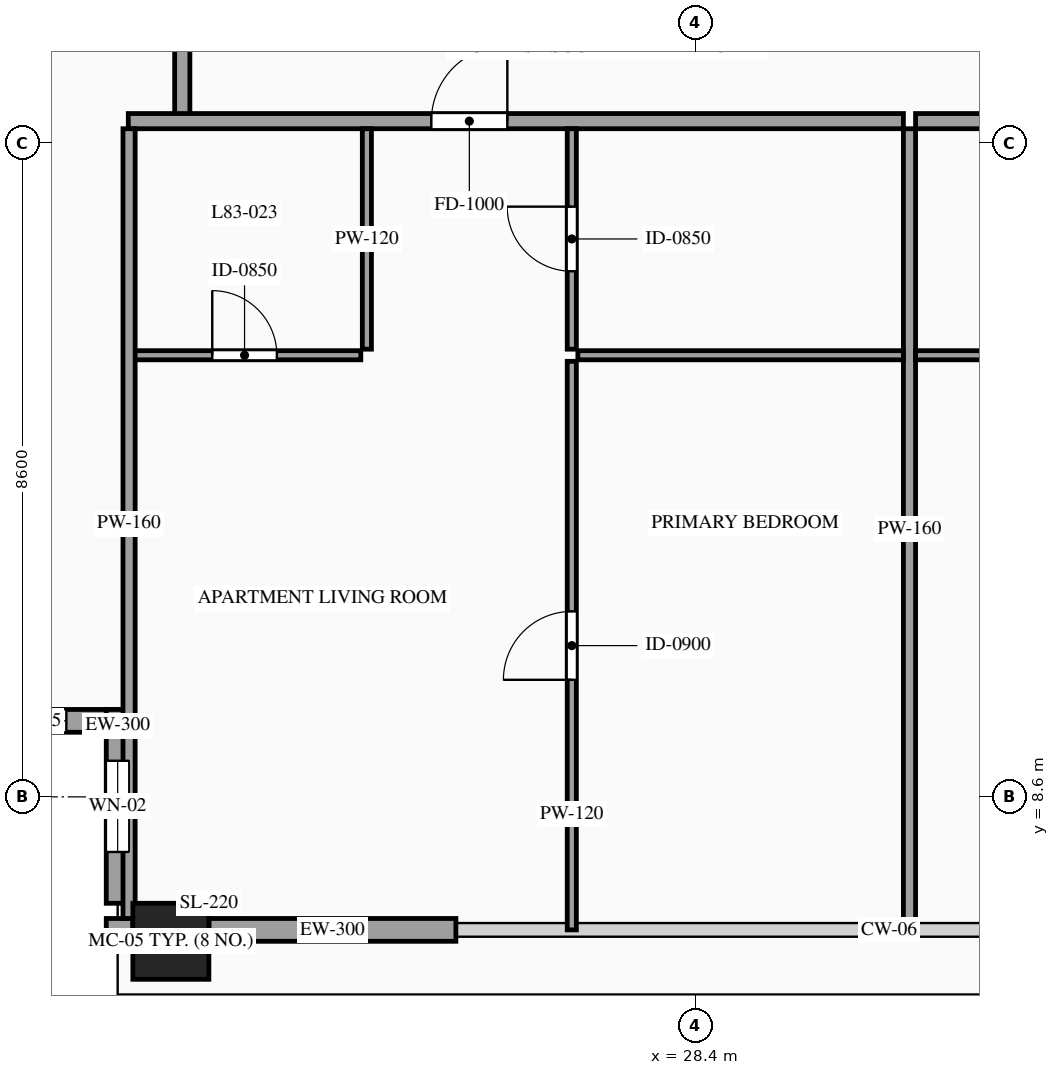
"""IFC4 building model, lengths in metres.
Left out: names, types, materials, properties, quantities, classifications, styles, units other than length and angle.
Written with IfcOpenShell. Run it as: python <this file> out.ifc"""

import sys

from ifc_helpers import new_model, si_unit, direction, frame, frame_2d, origin, origin_2d, place, context, subcontext, project, spatial, rectangle, hollow_rectangle, extrude, source, transform, mapped, element, fill, save


model = new_model("IFC4")
c1 = context("Model", 3, precision=1e-05, world=origin(), true_north=direction((0.0, 1.0)))
c2 = subcontext(c1, "Body", "Model", "MODEL_VIEW")
j1 = project(units=[si_unit("LENGTHUNIT", "METRE"), si_unit("PLANEANGLEUNIT", "RADIAN")], contexts=[c1])
p1 = place(None, origin())
s1 = spatial("IfcSite", under=j1, at=p1, CompositionType="ELEMENT")
p2 = place(p1, origin())
s2 = spatial("IfcBuilding", under=s1, at=p2, CompositionType="ELEMENT")
p3 = place(p2, frame((0.0, 0.0, 311.2)))
s3 = spatial("IfcBuildingStorey", under=s2, at=p3, CompositionType="ELEMENT", Elevation=311.2)
m1 = source(origin(), c2, "Body", "SweptSolid", [
    extrude(hollow_rectangle(XDim=1.0, YDim=1.0, WallThickness=0.048, at=origin_2d()), origin(), (0.0, 0.0, 1.0), 3.5),
])
p4 = place(p3, frame((21.5, 6.7, 0.0), z_axis=(0.0, 0.0, 1.0), x_axis=(1.0, 0.0, 0.0)))
e1 = element("IfcColumn", 1, at=p4, inside=s3, PredefinedType="COLUMN", context=c2, shape_type="MappedRepresentation", body=[
    mapped(m1, transform((0.0, 0.0, 0.0), scale=1.0)),
])
p5 = place(p3, frame((18.4, 9.6, 0.0), z_axis=(0.0, 0.0, 1.0), x_axis=(1.0, 0.0, 0.0)))
e2 = element("IfcWall", 2, at=p5, inside=s3, PredefinedType="SOLIDWALL", context=c2, shape_type="SweptSolid", body=[
    extrude(rectangle(XDim=2.55, YDim=0.3, at=frame_2d((1.275, 0.0))), origin(), (0.0, 0.0, 1.0), 3.28),
])
p6 = place(p5, frame((0.825, 0.0, 0.85)))
e3 = element("IfcOpeningElement", 3, at=p6, cuts=e2, PredefinedType="OPENING", context=c2, shape_type="SweptSolid", body=[
    extrude(rectangle(XDim=0.9, YDim=1.5, at=frame_2d((0.45, 0.75))), frame((0.0, 0.165, 0.0), z_axis=(0.0, -1.0, 0.0), x_axis=(1.0, 0.0, 0.0)), (0.0, 0.0, 1.0), 0.33),
])
p7 = place(p3, frame((20.8, 9.75, 0.0), z_axis=(0.0, 0.0, 1.0), x_axis=(0.0, -1.0, 0.0)))
e4 = element("IfcWall", 4, at=p7, inside=s3, PredefinedType="SOLIDWALL", context=c2, shape_type="SweptSolid", body=[
    extrude(rectangle(XDim=2.55, YDim=0.3, at=frame_2d((1.275, 0.0))), origin(), (0.0, 0.0, 1.0), 3.28),
])
p8 = place(p7, frame((0.675, 0.0, 0.85)))
e5 = element("IfcOpeningElement", 5, at=p8, cuts=e4, PredefinedType="OPENING", context=c2, shape_type="SweptSolid", body=[
    extrude(rectangle(XDim=1.2, YDim=2.1, at=frame_2d((0.6, 1.05))), frame((0.0, 0.165, 0.0), z_axis=(0.0, -1.0, 0.0), x_axis=(1.0, 0.0, 0.0)), (0.0, 0.0, 1.0), 0.33),
])
m2 = source(origin(), c2, "Body", "SweptSolid", [
    extrude(rectangle(XDim=0.35, YDim=0.3, at=frame_2d((0.175, 0.0))), origin(), (0.0, 0.0, 1.0), 3.28),
])
p9 = place(p3, frame((20.65, 6.85, 0.0), z_axis=(0.0, 0.0, 1.0), x_axis=(1.0, 0.0, 0.0)))
e6 = element("IfcWall", 6, at=p9, inside=s3, PredefinedType="SOLIDWALL", context=c2, shape_type="MappedRepresentation", body=[
    mapped(m2, transform((0.0, 0.0, 0.0), scale=1.0)),
])
m3 = source(origin(), c2, "Body", "SweptSolid", [
    extrude(rectangle(XDim=3.25, YDim=0.3, at=frame_2d((1.625, 0.0))), origin(), (0.0, 0.0, 1.0), 2.885),
])
p10 = place(p3, frame((22.0, 6.85, 0.0), z_axis=(0.0, 0.0, 1.0), x_axis=(1.0, 0.0, 0.0)))
e7 = element("IfcWall", 7, at=p10, inside=s3, PredefinedType="SOLIDWALL", context=c2, shape_type="MappedRepresentation", body=[
    mapped(m3, transform((0.0, 0.0, 0.0), scale=1.0)),
])
m4 = source(origin(), c2, "Body", "SweptSolid", [
    extrude(rectangle(XDim=1.7, YDim=0.2, at=frame_2d((0.85, 0.0))), origin(), (0.0, 0.0, 1.0), 3.28),
])
p11 = place(p3, frame((21.65, 17.55, 0.0), z_axis=(0.0, 0.0, 1.0), x_axis=(0.0, 1.0, 0.0)))
e8 = element("IfcWall", 8, at=p11, inside=s3, PredefinedType="PARTITIONING", context=c2, shape_type="MappedRepresentation", body=[
    mapped(m4, transform((0.0, 0.0, 0.0), scale=1.0)),
])
p12 = place(p3, frame((20.94, 17.49, 0.0), z_axis=(0.0, 0.0, 1.0), x_axis=(1.0, 0.0, 0.0)))
e9 = element("IfcWall", 9, at=p12, inside=s3, PredefinedType="PARTITIONING", context=c2, shape_type="SweptSolid", body=[
    extrude(rectangle(XDim=10.198, YDim=0.2, at=frame_2d((5.099, 0.0))), origin(), (0.0, 0.0, 1.0), 3.28),
])
p13 = place(p12, frame((3.987, 0.0, 0.0)))
e10 = element("IfcOpeningElement", 10, at=p13, cuts=e9, PredefinedType="OPENING", context=c2, shape_type="SweptSolid", body=[
    extrude(rectangle(XDim=1.0, YDim=2.2, at=frame_2d((0.5, 1.1))), frame((0.0, 0.115, 0.0), z_axis=(0.0, -1.0, 0.0), x_axis=(1.0, 0.0, 0.0)), (0.0, 0.0, 1.0), 0.23),
])
m5 = source(origin(), c2, "Body", "SweptSolid", [
    extrude(rectangle(XDim=10.54, YDim=0.16, at=frame_2d((5.27, 0.0))), origin(), (0.0, 0.0, 1.0), 3.28),
])
p14 = place(p3, frame((31.218, 6.85, 0.0), z_axis=(0.0, 0.0, 1.0), x_axis=(0.0, 1.0, 0.0)))
e11 = element("IfcWall", 11, at=p14, inside=s3, PredefinedType="PARTITIONING", context=c2, shape_type="MappedRepresentation", body=[
    mapped(m5, transform((0.0, 0.0, 0.0), scale=1.0)),
])
p15 = place(p3, frame((20.94, 14.41, 0.0), z_axis=(0.0, 0.0, 1.0), x_axis=(1.0, 0.0, 0.0)))
e12 = element("IfcWall", 12, at=p15, inside=s3, PredefinedType="PARTITIONING", context=c2, shape_type="SweptSolid", body=[
    extrude(rectangle(XDim=3.059, YDim=0.12, at=frame_2d((1.53, 0.0))), origin(), (0.0, 0.0, 1.0), 3.28),
])
p16 = place(p15, frame((1.104, 0.0, 0.0)))
e13 = element("IfcOpeningElement", 13, at=p16, cuts=e12, PredefinedType="OPENING", context=c2, shape_type="SweptSolid", body=[
    extrude(rectangle(XDim=0.85, YDim=2.1, at=frame_2d((0.425, 1.05))), frame((0.0, 0.075, 0.0), z_axis=(0.0, -1.0, 0.0), x_axis=(1.0, 0.0, 0.0)), (0.0, 0.0, 1.0), 0.15),
])
m6 = source(origin(), c2, "Body", "SweptSolid", [
    extrude(rectangle(XDim=2.9, YDim=0.12, at=frame_2d((1.45, 0.0))), origin(), (0.0, 0.0, 1.0), 3.28),
])
p17 = place(p3, frame((24.079, 14.49, 0.0), z_axis=(0.0, 0.0, 1.0), x_axis=(0.0, 1.0, 0.0)))
e14 = element("IfcWall", 14, at=p17, inside=s3, PredefinedType="PARTITIONING", context=c2, shape_type="MappedRepresentation", body=[
    mapped(m6, transform((0.0, 0.0, 0.0), scale=1.0)),
])
m7 = source(origin(), c2, "Body", "SweptSolid", [
    extrude(rectangle(XDim=4.283, YDim=0.12, at=frame_2d((2.142, 0.0))), origin(), (0.0, 0.0, 1.0), 3.28),
])
p18 = place(p3, frame((26.855, 14.41, 0.0), z_axis=(0.0, 0.0, 1.0), x_axis=(1.0, 0.0, 0.0)))
e15 = element("IfcWall", 15, at=p18, inside=s3, PredefinedType="PARTITIONING", context=c2, shape_type="MappedRepresentation", body=[
    mapped(m7, transform((0.0, 0.0, 0.0), scale=1.0)),
])
p19 = place(p3, frame((26.775, 14.49, 0.0), z_axis=(0.0, 0.0, 1.0), x_axis=(0.0, 1.0, 0.0)))
e16 = element("IfcWall", 16, at=p19, inside=s3, PredefinedType="PARTITIONING", context=c2, shape_type="SweptSolid", body=[
    extrude(rectangle(XDim=2.9, YDim=0.12, at=frame_2d((1.45, 0.0))), origin(), (0.0, 0.0, 1.0), 3.28),
])
p20 = place(p19, frame((1.025, 0.0, 0.0)))
e17 = element("IfcOpeningElement", 17, at=p20, cuts=e16, PredefinedType="OPENING", context=c2, shape_type="SweptSolid", body=[
    extrude(rectangle(XDim=0.85, YDim=2.1, at=frame_2d((0.425, 1.05))), frame((0.0, 0.075, 0.0), z_axis=(0.0, -1.0, 0.0), x_axis=(1.0, 0.0, 0.0)), (0.0, 0.0, 1.0), 0.15),
])
p21 = place(p3, frame((26.775, 6.85, 0.0), z_axis=(0.0, 0.0, 1.0), x_axis=(0.0, 1.0, 0.0)))
e18 = element("IfcWall", 18, at=p21, inside=s3, PredefinedType="PARTITIONING", context=c2, shape_type="SweptSolid", body=[
    extrude(rectangle(XDim=7.48, YDim=0.12, at=frame_2d((3.74, 0.0))), origin(), (0.0, 0.0, 1.0), 3.28),
])
p22 = place(p21, frame((3.29, 0.0, 0.0)))
e19 = element("IfcOpeningElement", 19, at=p22, cuts=e18, PredefinedType="OPENING", context=c2, shape_type="SweptSolid", body=[
    extrude(rectangle(XDim=0.9, YDim=2.15, at=frame_2d((0.45, 1.075))), frame((0.0, 0.075, 0.0), z_axis=(0.0, -1.0, 0.0), x_axis=(1.0, 0.0, 0.0)), (0.0, 0.0, 1.0), 0.15),
])
p23 = place(p3, frame((31.298, 17.49, 0.0), z_axis=(0.0, 0.0, 1.0), x_axis=(1.0, 0.0, 0.0)))
e20 = element("IfcWall", 20, at=p23, inside=s3, PredefinedType="PARTITIONING", context=c2, shape_type="SweptSolid", body=[
    extrude(rectangle(XDim=10.761, YDim=0.2, at=frame_2d((5.38, 0.0))), origin(), (0.0, 0.0, 1.0), 3.28),
])
p24 = place(p23, frame((4.234, 0.0, 0.0)))
e21 = element("IfcOpeningElement", 21, at=p24, cuts=e20, PredefinedType="OPENING", context=c2, shape_type="SweptSolid", body=[
    extrude(rectangle(XDim=1.0, YDim=2.2, at=frame_2d((0.5, 1.1))), frame((0.0, 0.115, 0.0), z_axis=(0.0, -1.0, 0.0), x_axis=(1.0, 0.0, 0.0)), (0.0, 0.0, 1.0), 0.23),
])
p25 = place(p3, frame((31.298, 14.41, 0.0), z_axis=(0.0, 0.0, 1.0), x_axis=(1.0, 0.0, 0.0)))
e22 = element("IfcWall", 22, at=p25, inside=s3, PredefinedType="PARTITIONING", context=c2, shape_type="SweptSolid", body=[
    extrude(rectangle(XDim=3.228, YDim=0.12, at=frame_2d((1.614, 0.0))), origin(), (0.0, 0.0, 1.0), 3.28),
])
p26 = place(p25, frame((1.189, 0.0, 0.0)))
e23 = element("IfcOpeningElement", 23, at=p26, cuts=e22, PredefinedType="OPENING", context=c2, shape_type="SweptSolid", body=[
    extrude(rectangle(XDim=0.85, YDim=2.1, at=frame_2d((0.425, 1.05))), frame((0.0, 0.075, 0.0), z_axis=(0.0, -1.0, 0.0), x_axis=(1.0, 0.0, 0.0)), (0.0, 0.0, 1.0), 0.15),
])
m8 = source(origin(), c2, "Body", "SweptSolid", [
    extrude(rectangle(XDim=10.39, YDim=0.16, at=frame_2d((5.195, 0.0))), origin(), (0.0, 0.0, 1.0), 3.28),
])
p27 = place(p3, frame((20.95, 7.0, 0.0), z_axis=(0.0, 0.0, 1.0), x_axis=(0.0, 1.0, 0.0)))
e24 = element("IfcWall", 24, at=p27, inside=s3, PredefinedType="PARTITIONING", context=c2, shape_type="MappedRepresentation", body=[
    mapped(m8, transform((0.0, 0.0, 0.0), scale=1.0)),
])
m9 = source(origin(), c2, "Body", "SweptSolid", [
    extrude(rectangle(XDim=0.9, YDim=1.5, at=frame_2d((0.45, 0.75))), frame((0.0, 0.03, 0.0), z_axis=(0.0, -1.0, 0.0), x_axis=(1.0, 0.0, 0.0)), (0.0, 0.0, 1.0), 0.06),
])
p28 = place(p6, origin())
e25 = element("IfcWindow", 25, at=p28, inside=s3, PartitioningType="SINGLE_PANEL", PredefinedType="WINDOW", context=c2, shape_type="MappedRepresentation", body=[
    mapped(m9, transform((0.0, 0.0, 0.0), scale=1.0)),
])
fill(e3, e25)
m10 = source(origin(), c2, "Body", "SweptSolid", [
    extrude(rectangle(XDim=1.2, YDim=2.1, at=frame_2d((0.6, 1.05))), frame((0.0, 0.03, 0.0), z_axis=(0.0, -1.0, 0.0), x_axis=(1.0, 0.0, 0.0)), (0.0, 0.0, 1.0), 0.06),
])
p29 = place(p8, origin())
e26 = element("IfcWindow", 26, at=p29, inside=s3, PartitioningType="SINGLE_PANEL", PredefinedType="WINDOW", context=c2, shape_type="MappedRepresentation", body=[
    mapped(m10, transform((0.0, 0.0, 0.0), scale=1.0)),
])
fill(e5, e26)
m11 = source(origin(), c2, "Body", "SweptSolid", [
    extrude(rectangle(XDim=1.0, YDim=2.2, at=frame_2d((0.5, 1.1))), frame((0.0, 0.025, 0.0), z_axis=(0.0, -1.0, 0.0), x_axis=(1.0, 0.0, 0.0)), (0.0, 0.0, 1.0), 0.05),
])
p30 = place(p13, origin())
e27 = element("IfcDoor", 27, at=p30, inside=s3, OperationType="SINGLE_SWING_RIGHT", PredefinedType="DOOR", context=c2, shape_type="MappedRepresentation", body=[
    mapped(m11, transform((0.0, 0.0, 0.0), scale=1.0)),
])
fill(e10, e27)
m12 = source(origin(), c2, "Body", "SweptSolid", [
    extrude(rectangle(XDim=0.85, YDim=2.1, at=frame_2d((0.425, 1.05))), frame((0.0, 0.025, 0.0), z_axis=(0.0, -1.0, 0.0), x_axis=(1.0, 0.0, 0.0)), (0.0, 0.0, 1.0), 0.05),
])
p31 = place(p16, origin())
e28 = element("IfcDoor", 28, at=p31, inside=s3, OperationType="SINGLE_SWING_LEFT", PredefinedType="DOOR", context=c2, shape_type="MappedRepresentation", body=[
    mapped(m12, transform((0.0, 0.0, 0.0), scale=1.0)),
])
fill(e13, e28)
p32 = place(p20, origin())
e29 = element("IfcDoor", 29, at=p32, inside=s3, OperationType="SINGLE_SWING_RIGHT", PredefinedType="DOOR", context=c2, shape_type="MappedRepresentation", body=[
    mapped(m12, transform((0.0, 0.0, 0.0), scale=1.0)),
])
fill(e17, e29)
m13 = source(origin(), c2, "Body", "SweptSolid", [
    extrude(rectangle(XDim=0.9, YDim=2.15, at=frame_2d((0.45, 1.075))), frame((0.0, 0.025, 0.0), z_axis=(0.0, -1.0, 0.0), x_axis=(1.0, 0.0, 0.0)), (0.0, 0.0, 1.0), 0.05),
])
p33 = place(p22, origin())
e30 = element("IfcDoor", 30, at=p33, inside=s3, OperationType="SINGLE_SWING_LEFT", PredefinedType="DOOR", context=c2, shape_type="MappedRepresentation", body=[
    mapped(m13, transform((0.0, 0.0, 0.0), scale=1.0)),
])
fill(e19, e30)
save(model, sys.argv[1])
